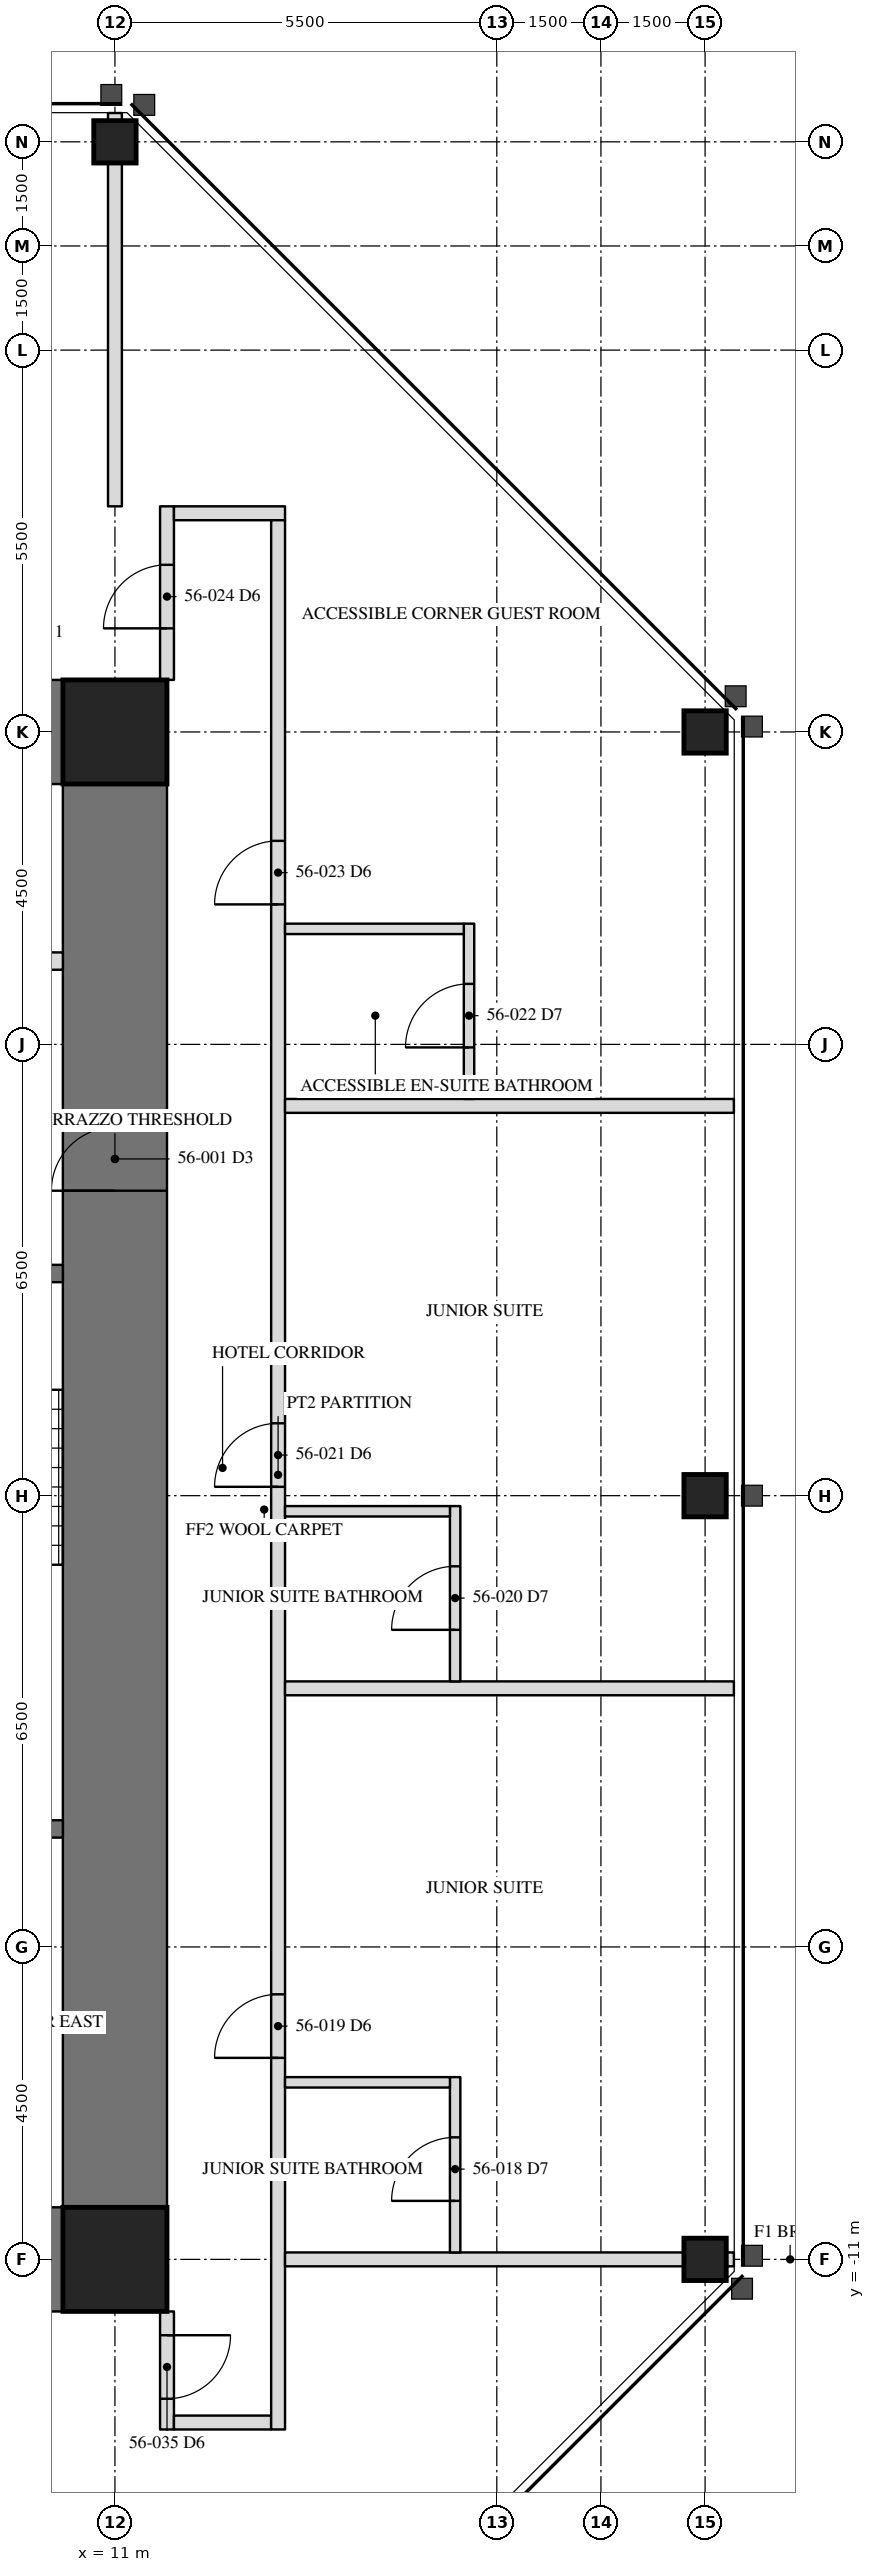
"""IFC4 building model, lengths in metres.
Left out: names, types, materials, properties, quantities, classifications, styles, units other than length and angle.
Written with IfcOpenShell. Run it as: python <this file> out.ifc"""

import sys

from ifc_helpers import new_model, si_unit, direction, frame, frame_2d, origin, origin_2d, place, context, subcontext, project, spatial, rectangle, hollow_rectangle, extrude, element, fill, save


model = new_model("IFC4")
c1 = context("Model", 3, precision=1e-05, world=origin(), true_north=direction((0.0, 1.0)))
c2 = subcontext(c1, "Body", "Model", "MODEL_VIEW")
j1 = project(units=[si_unit("LENGTHUNIT", "METRE"), si_unit("PLANEANGLEUNIT", "RADIAN")], contexts=[c1])
p1 = place(None, origin())
s1 = spatial("IfcSite", under=j1, at=p1, CompositionType="ELEMENT")
p2 = place(p1, origin())
s2 = spatial("IfcBuilding", under=s1, at=p2, CompositionType="ELEMENT")
p3 = place(p2, frame((0.0, 0.0, 232.7)))
s3 = spatial("IfcBuildingStorey", under=s2, at=p3, CompositionType="ELEMENT", Elevation=232.7)
for number, where, z_axis, x_axis in (
    (1, (19.5, -11.0, 0.0), (0.0, 0.0, 1.0), (0.0, 1.0, 0.0)),
    (2, (19.5, 0.0, 0.0), (0.0, 0.0, 1.0), (0.0, 1.0, 0.0)),
    (3, (19.5, 11.0, 0.0), (0.0, 0.0, 1.0), (0.0, 1.0, 0.0)),
    (4, (11.0, 19.5, 0.0), (0.0, 0.0, 1.0), (1.0, 0.0, 0.0)),
):
    element("IfcColumn", number, at=place(p3, frame(where, z_axis=z_axis, x_axis=x_axis)), inside=s3, PredefinedType="COLUMN", context=c2, shape_type="SweptSolid", body=[
        extrude(hollow_rectangle(XDim=0.61, YDim=0.61, WallThickness=0.076, at=origin_2d()), origin(), (0.0, 0.0, 1.0), 3.5),
    ])
p4 = place(p3, frame((11.0, -11.0, 0.0), z_axis=(0.0, 0.0, 1.0), x_axis=(0.0, 1.0, 0.0)))
e5 = element("IfcWall", 5, at=p4, inside=s3, PredefinedType="SHEAR", context=c2, shape_type="SweptSolid", body=[
    extrude(rectangle(XDim=22.0, YDim=1.5, at=frame_2d((11.0, 0.0))), origin(), (0.0, 0.0, 1.0), 3.5),
])
p5 = place(p4, frame((15.393, 0.0, 0.0)))
e6 = element("IfcOpeningElement", 6, at=p5, cuts=e5, PredefinedType="OPENING", context=c2, shape_type="SweptSolid", body=[
    extrude(rectangle(XDim=0.915, YDim=2.134, at=frame_2d((0.458, 1.067))), frame((0.0, 0.76, 0.0), z_axis=(0.0, -1.0, 0.0), x_axis=(1.0, 0.0, 0.0)), (0.0, 0.0, 1.0), 1.52),
])
for number, where, z_axis, x_axis in (
    (7, (11.0, 11.0, 0.0), (0.0, 0.0, 1.0), (-1.0, 0.0, 0.0)),
    (8, (6.5, -11.0, 0.0), (0.0, 0.0, 1.0), (1.0, 0.0, 0.0)),
):
    element("IfcWall", number, at=place(p3, frame(where, z_axis=z_axis, x_axis=x_axis)), inside=s3, PredefinedType="SHEAR", context=c2, shape_type="SweptSolid", body=[
        extrude(rectangle(XDim=4.5, YDim=1.5, at=frame_2d((2.25, 0.0))), origin(), (0.0, 0.0, 1.0), 3.5),
    ])
for number, where, z_axis, x_axis in (
    (9, (11.0, 11.0, 0.0), (0.0, 0.0, 1.0), (1.0, 0.0, 0.0)),
    (10, (11.0, -11.0, 0.0), (0.0, 0.0, 1.0), (1.0, 0.0, 0.0)),
):
    element("IfcColumn", number, at=place(p3, frame(where, z_axis=z_axis, x_axis=x_axis)), inside=s3, PredefinedType="COLUMN", context=c2, shape_type="SweptSolid", body=[
        extrude(hollow_rectangle(XDim=1.499, YDim=1.499, WallThickness=0.102, at=origin_2d()), origin(), (0.0, 0.0, 1.0), 3.5),
    ])
p6 = place(p3, frame((6.95, -4.8, 0.0), z_axis=(0.0, 0.0, 1.0), x_axis=(1.0, 0.0, 0.0)))
e11 = element("IfcWall", 11, at=p6, inside=s3, PredefinedType="SOLIDWALL", context=c2, shape_type="SweptSolid", body=[
    extrude(rectangle(XDim=3.3, YDim=0.25, at=frame_2d((1.65, 0.0))), origin(), (0.0, 0.0, 1.0), 3.31),
])
p7 = place(p3, frame((6.95, 3.2, 0.0), z_axis=(0.0, 0.0, 1.0), x_axis=(1.0, 0.0, 0.0)))
e12 = element("IfcWall", 12, at=p7, inside=s3, PredefinedType="SOLIDWALL", context=c2, shape_type="SweptSolid", body=[
    extrude(rectangle(XDim=3.3, YDim=0.25, at=frame_2d((1.65, 0.0))), origin(), (0.0, 0.0, 1.0), 3.31),
])
p8 = place(p7, frame((1.116, 0.0, 0.0)))
e13 = element("IfcOpeningElement", 13, at=p8, cuts=e12, PredefinedType="OPENING", context=c2, shape_type="SweptSolid", body=[
    extrude(rectangle(XDim=1.067, YDim=2.134, at=frame_2d((0.533, 1.067))), frame((0.0, 0.135, 0.0), z_axis=(0.0, -1.0, 0.0), x_axis=(1.0, 0.0, 0.0)), (0.0, 0.0, 1.0), 0.27),
])
p9 = place(p3, frame((6.95, 7.7, 0.0), z_axis=(0.0, 0.0, 1.0), x_axis=(1.0, 0.0, 0.0)))
e14 = element("IfcWall", 14, at=p9, inside=s3, PredefinedType="PARTITIONING", context=c2, shape_type="SweptSolid", body=[
    extrude(rectangle(XDim=3.3, YDim=0.25, at=frame_2d((1.65, 0.0))), origin(), (0.0, 0.0, 1.0), 3.31),
])
p10 = place(p9, frame((0.45, 0.0, 0.0)))
e15 = element("IfcOpeningElement", 15, at=p10, cuts=e14, PredefinedType="OPENING", context=c2, shape_type="SweptSolid", body=[
    extrude(rectangle(XDim=1.219, YDim=2.134, at=frame_2d((0.609, 1.067))), frame((0.0, 0.135, 0.0), z_axis=(0.0, -1.0, 0.0), x_axis=(1.0, 0.0, 0.0)), (0.0, 0.0, 1.0), 0.27),
])
p11 = place(p3, frame((11.75, 11.75, 0.0), z_axis=(0.0, 0.0, 1.0), x_axis=(0.0, 1.0, 0.0)))
e16 = element("IfcWall", 16, at=p11, inside=s3, PredefinedType="PARTITIONING", context=c2, shape_type="SweptSolid", body=[
    extrude(rectangle(XDim=2.5, YDim=0.2, at=frame_2d((1.25, 0.0))), origin(), (0.0, 0.0, 1.0), 3.31),
])
p12 = place(p11, frame((0.742, 0.0, 0.0)))
e17 = element("IfcOpeningElement", 17, at=p12, cuts=e16, PredefinedType="OPENING", context=c2, shape_type="SweptSolid", body=[
    extrude(rectangle(XDim=0.915, YDim=2.134, at=frame_2d((0.458, 1.067))), frame((0.0, 0.11, 0.0), z_axis=(0.0, -1.0, 0.0), x_axis=(1.0, 0.0, 0.0)), (0.0, 0.0, 1.0), 0.22),
])
p13 = place(p3, frame((13.45, 14.15, 0.0), z_axis=(0.0, 0.0, 1.0), x_axis=(-1.0, 0.0, 0.0)))
e18 = element("IfcWall", 18, at=p13, inside=s3, PredefinedType="PARTITIONING", context=c2, shape_type="SweptSolid", body=[
    extrude(rectangle(XDim=1.6, YDim=0.2, at=frame_2d((0.8, 0.0))), origin(), (0.0, 0.0, 1.0), 3.31),
])
p14 = place(p3, frame((11.75, -11.75, 0.0), z_axis=(0.0, 0.0, 1.0), x_axis=(0.0, -1.0, 0.0)))
e19 = element("IfcWall", 19, at=p14, inside=s3, PredefinedType="PARTITIONING", context=c2, shape_type="SweptSolid", body=[
    extrude(rectangle(XDim=1.7, YDim=0.2, at=frame_2d((0.85, 0.0))), origin(), (0.0, 0.0, 1.0), 3.31),
])
p15 = place(p14, frame((0.343, 0.0, 0.0)))
e20 = element("IfcOpeningElement", 20, at=p15, cuts=e19, PredefinedType="OPENING", context=c2, shape_type="SweptSolid", body=[
    extrude(rectangle(XDim=0.915, YDim=2.134, at=frame_2d((0.458, 1.067))), frame((0.0, 0.11, 0.0), z_axis=(0.0, -1.0, 0.0), x_axis=(1.0, 0.0, 0.0)), (0.0, 0.0, 1.0), 0.22),
])
p16 = place(p3, frame((11.85, -13.35, 0.0), z_axis=(0.0, 0.0, 1.0), x_axis=(1.0, 0.0, 0.0)))
e21 = element("IfcWall", 21, at=p16, inside=s3, PredefinedType="PARTITIONING", context=c2, shape_type="SweptSolid", body=[
    extrude(rectangle(XDim=1.4, YDim=0.2, at=frame_2d((0.7, 0.0))), origin(), (0.0, 0.0, 1.0), 3.31),
])
p17 = place(p3, frame((13.35, -13.45, 0.0), z_axis=(0.0, 0.0, 1.0), x_axis=(0.0, 1.0, 0.0)))
e22 = element("IfcWall", 22, at=p17, inside=s3, PredefinedType="PARTITIONING", context=c2, shape_type="SweptSolid", body=[
    extrude(rectangle(XDim=27.5, YDim=0.2, at=frame_2d((13.75, 0.0))), origin(), (0.0, 0.0, 1.0), 3.31),
])
p18 = place(p17, frame((5.353, 0.0, 0.0)))
e23 = element("IfcOpeningElement", 23, at=p18, cuts=e22, PredefinedType="OPENING", context=c2, shape_type="SweptSolid", body=[
    extrude(rectangle(XDim=0.915, YDim=2.134, at=frame_2d((0.458, 1.067))), frame((0.0, 0.11, 0.0), z_axis=(0.0, -1.0, 0.0), x_axis=(1.0, 0.0, 0.0)), (0.0, 0.0, 1.0), 0.22),
])
p19 = place(p17, frame((13.577, 0.0, 0.0)))
e24 = element("IfcOpeningElement", 24, at=p19, cuts=e22, PredefinedType="OPENING", context=c2, shape_type="SweptSolid", body=[
    extrude(rectangle(XDim=0.915, YDim=2.134, at=frame_2d((0.458, 1.067))), frame((0.0, 0.11, 0.0), z_axis=(0.0, -1.0, 0.0), x_axis=(1.0, 0.0, 0.0)), (0.0, 0.0, 1.0), 0.22),
])
p20 = place(p17, frame((21.967, 0.0, 0.0)))
e25 = element("IfcOpeningElement", 25, at=p20, cuts=e22, PredefinedType="OPENING", context=c2, shape_type="SweptSolid", body=[
    extrude(rectangle(XDim=0.915, YDim=2.134, at=frame_2d((0.458, 1.067))), frame((0.0, 0.11, 0.0), z_axis=(0.0, -1.0, 0.0), x_axis=(1.0, 0.0, 0.0)), (0.0, 0.0, 1.0), 0.22),
])
p21 = place(p3, frame((13.45, -11.0, 0.0), z_axis=(0.0, 0.0, 1.0), x_axis=(1.0, 0.0, 0.0)))
e26 = element("IfcWall", 26, at=p21, inside=s3, PredefinedType="PARTITIONING", context=c2, shape_type="SweptSolid", body=[
    extrude(rectangle(XDim=6.465, YDim=0.2, at=frame_2d((3.232, 0.0))), origin(), (0.0, 0.0, 1.0), 2.802),
])
for number, where, z_axis, x_axis in (
    (27, (13.45, -2.775, 0.0), (0.0, 0.0, 1.0), (1.0, 0.0, 0.0)),
    (28, (13.45, 5.614, 0.0), (0.0, 0.0, 1.0), (1.0, 0.0, 0.0)),
):
    element("IfcWall", number, at=place(p3, frame(where, z_axis=z_axis, x_axis=x_axis)), inside=s3, PredefinedType="PARTITIONING", context=c2, shape_type="SweptSolid", body=[
        extrude(rectangle(XDim=6.465, YDim=0.2, at=frame_2d((3.232, 0.0))), origin(), (0.0, 0.0, 1.0), 3.31),
    ])
p22 = place(p3, frame((15.9, -10.9, 0.0), z_axis=(0.0, 0.0, 1.0), x_axis=(0.0, 1.0, 0.0)))
e29 = element("IfcWall", 29, at=p22, inside=s3, PredefinedType="PARTITIONING", context=c2, shape_type="SweptSolid", body=[
    extrude(rectangle(XDim=2.525, YDim=0.15, at=frame_2d((1.262, 0.0))), origin(), (0.0, 0.0, 1.0), 3.31),
])
p23 = place(p22, frame((0.742, 0.0, 0.0)))
e30 = element("IfcOpeningElement", 30, at=p23, cuts=e29, PredefinedType="OPENING", context=c2, shape_type="SweptSolid", body=[
    extrude(rectangle(XDim=0.915, YDim=2.032, at=frame_2d((0.458, 1.016))), frame((0.0, 0.085, 0.0), z_axis=(0.0, -1.0, 0.0), x_axis=(1.0, 0.0, 0.0)), (0.0, 0.0, 1.0), 0.17),
])
p24 = place(p3, frame((13.45, -8.45, 0.0), z_axis=(0.0, 0.0, 1.0), x_axis=(1.0, 0.0, 0.0)))
e31 = element("IfcWall", 31, at=p24, inside=s3, PredefinedType="PARTITIONING", context=c2, shape_type="SweptSolid", body=[
    extrude(rectangle(XDim=2.375, YDim=0.15, at=frame_2d((1.188, 0.0))), origin(), (0.0, 0.0, 1.0), 3.31),
])
p25 = place(p3, frame((15.9, -2.675, 0.0), z_axis=(0.0, 0.0, 1.0), x_axis=(0.0, 1.0, 0.0)))
e32 = element("IfcWall", 32, at=p25, inside=s3, PredefinedType="PARTITIONING", context=c2, shape_type="SweptSolid", body=[
    extrude(rectangle(XDim=2.525, YDim=0.15, at=frame_2d((1.263, 0.0))), origin(), (0.0, 0.0, 1.0), 3.31),
])
p26 = place(p25, frame((0.742, 0.0, 0.0)))
e33 = element("IfcOpeningElement", 33, at=p26, cuts=e32, PredefinedType="OPENING", context=c2, shape_type="SweptSolid", body=[
    extrude(rectangle(XDim=0.915, YDim=2.032, at=frame_2d((0.458, 1.016))), frame((0.0, 0.085, 0.0), z_axis=(0.0, -1.0, 0.0), x_axis=(1.0, 0.0, 0.0)), (0.0, 0.0, 1.0), 0.17),
])
p27 = place(p3, frame((13.45, -0.225, 0.0), z_axis=(0.0, 0.0, 1.0), x_axis=(1.0, 0.0, 0.0)))
e34 = element("IfcWall", 34, at=p27, inside=s3, PredefinedType="PARTITIONING", context=c2, shape_type="SweptSolid", body=[
    extrude(rectangle(XDim=2.375, YDim=0.15, at=frame_2d((1.188, 0.0))), origin(), (0.0, 0.0, 1.0), 3.31),
])
p28 = place(p3, frame((16.1, 5.714, 0.0), z_axis=(0.0, 0.0, 1.0), x_axis=(0.0, 1.0, 0.0)))
e35 = element("IfcWall", 35, at=p28, inside=s3, PredefinedType="PARTITIONING", context=c2, shape_type="SweptSolid", body=[
    extrude(rectangle(XDim=2.525, YDim=0.15, at=frame_2d((1.262, 0.0))), origin(), (0.0, 0.0, 1.0), 3.31),
])
p29 = place(p28, frame((0.742, 0.0, 0.0)))
e36 = element("IfcOpeningElement", 36, at=p29, cuts=e35, PredefinedType="OPENING", context=c2, shape_type="SweptSolid", body=[
    extrude(rectangle(XDim=0.915, YDim=2.032, at=frame_2d((0.458, 1.016))), frame((0.0, 0.085, 0.0), z_axis=(0.0, -1.0, 0.0), x_axis=(1.0, 0.0, 0.0)), (0.0, 0.0, 1.0), 0.17),
])
p30 = place(p3, frame((13.45, 8.164, 0.0), z_axis=(0.0, 0.0, 1.0), x_axis=(1.0, 0.0, 0.0)))
e37 = element("IfcWall", 37, at=p30, inside=s3, PredefinedType="PARTITIONING", context=c2, shape_type="SweptSolid", body=[
    extrude(rectangle(XDim=2.575, YDim=0.15, at=frame_2d((1.288, 0.0))), origin(), (0.0, 0.0, 1.0), 3.31),
])
p31 = place(p3, frame((11.0, 14.25, 0.0), z_axis=(0.0, 0.0, 1.0), x_axis=(0.0, 1.0, 0.0)))
e38 = element("IfcWall", 38, at=p31, inside=s3, PredefinedType="PARTITIONING", context=c2, shape_type="SweptSolid", body=[
    extrude(rectangle(XDim=5.665, YDim=0.2, at=frame_2d((2.833, 0.0))), origin(), (0.0, 0.0, 1.0), 2.802),
])
p32 = place(p5, origin())
e39 = element("IfcDoor", 39, at=p32, inside=s3, OperationType="SINGLE_SWING_RIGHT", PredefinedType="DOOR", context=c2, shape_type="SweptSolid", body=[
    extrude(rectangle(XDim=0.915, YDim=2.134, at=frame_2d((0.458, 1.067))), frame((0.0, -0.675, 0.0), z_axis=(0.0, -1.0, 0.0), x_axis=(1.0, 0.0, 0.0)), (0.0, 0.0, 1.0), 0.05),
])
fill(e6, e39)
p33 = place(p23, origin())
e40 = element("IfcDoor", 40, at=p33, inside=s3, OperationType="SINGLE_SWING_LEFT", PredefinedType="DOOR", context=c2, shape_type="SweptSolid", body=[
    extrude(rectangle(XDim=0.915, YDim=2.032, at=frame_2d((0.458, 1.016))), frame((0.0, 0.025, 0.0), z_axis=(0.0, -1.0, 0.0), x_axis=(1.0, 0.0, 0.0)), (0.0, 0.0, 1.0), 0.05),
])
fill(e30, e40)
p34 = place(p18, origin())
e41 = element("IfcDoor", 41, at=p34, inside=s3, OperationType="SINGLE_SWING_LEFT", PredefinedType="DOOR", context=c2, shape_type="SweptSolid", body=[
    extrude(rectangle(XDim=0.915, YDim=2.134, at=frame_2d((0.458, 1.067))), frame((0.0, 0.025, 0.0), z_axis=(0.0, -1.0, 0.0), x_axis=(1.0, 0.0, 0.0)), (0.0, 0.0, 1.0), 0.05),
])
fill(e23, e41)
p35 = place(p26, origin())
e42 = element("IfcDoor", 42, at=p35, inside=s3, OperationType="SINGLE_SWING_LEFT", PredefinedType="DOOR", context=c2, shape_type="SweptSolid", body=[
    extrude(rectangle(XDim=0.915, YDim=2.032, at=frame_2d((0.458, 1.016))), frame((0.0, 0.025, 0.0), z_axis=(0.0, -1.0, 0.0), x_axis=(1.0, 0.0, 0.0)), (0.0, 0.0, 1.0), 0.05),
])
fill(e33, e42)
p36 = place(p19, origin())
e43 = element("IfcDoor", 43, at=p36, inside=s3, OperationType="SINGLE_SWING_LEFT", PredefinedType="DOOR", context=c2, shape_type="SweptSolid", body=[
    extrude(rectangle(XDim=0.915, YDim=2.134, at=frame_2d((0.458, 1.067))), frame((0.0, 0.025, 0.0), z_axis=(0.0, -1.0, 0.0), x_axis=(1.0, 0.0, 0.0)), (0.0, 0.0, 1.0), 0.05),
])
fill(e24, e43)
p37 = place(p29, origin())
e44 = element("IfcDoor", 44, at=p37, inside=s3, OperationType="SINGLE_SWING_LEFT", PredefinedType="DOOR", context=c2, shape_type="SweptSolid", body=[
    extrude(rectangle(XDim=0.915, YDim=2.032, at=frame_2d((0.458, 1.016))), frame((0.0, 0.025, 0.0), z_axis=(0.0, -1.0, 0.0), x_axis=(1.0, 0.0, 0.0)), (0.0, 0.0, 1.0), 0.05),
])
fill(e36, e44)
p38 = place(p20, origin())
e45 = element("IfcDoor", 45, at=p38, inside=s3, OperationType="SINGLE_SWING_LEFT", PredefinedType="DOOR", context=c2, shape_type="SweptSolid", body=[
    extrude(rectangle(XDim=0.915, YDim=2.134, at=frame_2d((0.458, 1.067))), frame((0.0, 0.025, 0.0), z_axis=(0.0, -1.0, 0.0), x_axis=(1.0, 0.0, 0.0)), (0.0, 0.0, 1.0), 0.05),
])
fill(e25, e45)
p39 = place(p12, origin())
e46 = element("IfcDoor", 46, at=p39, inside=s3, OperationType="SINGLE_SWING_LEFT", PredefinedType="DOOR", context=c2, shape_type="SweptSolid", body=[
    extrude(rectangle(XDim=0.915, YDim=2.134, at=frame_2d((0.458, 1.067))), frame((0.0, 0.025, 0.0), z_axis=(0.0, -1.0, 0.0), x_axis=(1.0, 0.0, 0.0)), (0.0, 0.0, 1.0), 0.05),
])
fill(e17, e46)
p40 = place(p15, origin())
e47 = element("IfcDoor", 47, at=p40, inside=s3, OperationType="SINGLE_SWING_LEFT", PredefinedType="DOOR", context=c2, shape_type="SweptSolid", body=[
    extrude(rectangle(XDim=0.915, YDim=2.134, at=frame_2d((0.458, 1.067))), frame((0.0, 0.025, 0.0), z_axis=(0.0, -1.0, 0.0), x_axis=(1.0, 0.0, 0.0)), (0.0, 0.0, 1.0), 0.05),
])
fill(e20, e47)
save(model, sys.argv[1])
